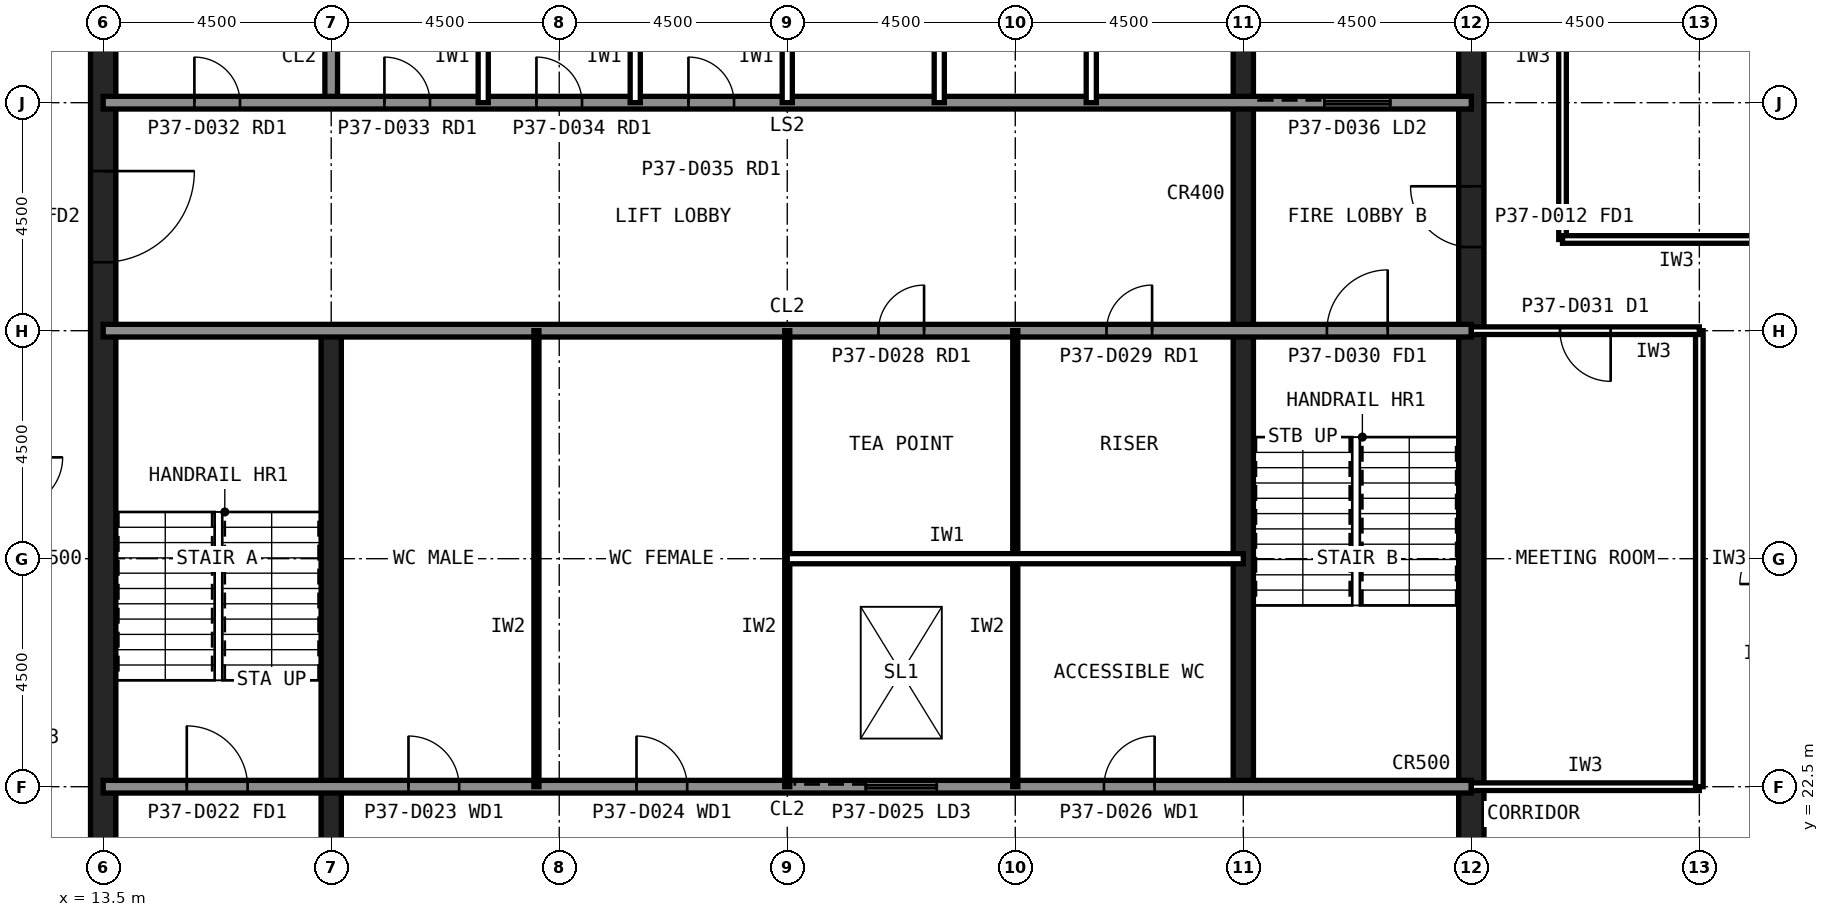
"""IFC4 building model, lengths in metres.
Left out: names, types, materials, properties, quantities, classifications, styles, units other than length and angle.
Written with IfcOpenShell. Run it as: python <this file> out.ifc"""

import sys

from ifc_helpers import new_model, si_unit, direction, frame, frame_2d, origin, place, context, subcontext, project, spatial, rectangle, extrude, element, fill, save


model = new_model("IFC4")
c1 = context("Model", 3, precision=1e-05, world=origin(), true_north=direction((0.0, 1.0)))
c2 = subcontext(c1, "Body", "Model", "MODEL_VIEW")
j1 = project(units=[si_unit("LENGTHUNIT", "METRE"), si_unit("PLANEANGLEUNIT", "RADIAN")], contexts=[c1])
p1 = place(None, origin())
s1 = spatial("IfcSite", under=j1, at=p1, CompositionType="ELEMENT")
p2 = place(p1, origin())
s2 = spatial("IfcBuilding", under=s1, at=p2, CompositionType="ELEMENT")
p3 = place(p2, frame((0.0, 0.0, 159.6)))
s3 = spatial("IfcBuildingStorey", under=s2, at=p3, CompositionType="ELEMENT", Elevation=159.6)
p4 = place(p3, frame((40.5, 13.5, 0.0), z_axis=(0.0, 0.0, 1.0), x_axis=(0.0, 1.0, 0.0)))
e1 = element("IfcWall", 1, at=p4, inside=s3, PredefinedType="SHEAR", context=c2, shape_type="SweptSolid", body=[
    extrude(rectangle(XDim=27.0, YDim=0.5, at=frame_2d((13.5, 0.0))), origin(), (0.0, 0.0, 1.0), 4.0),
])
p5 = place(p4, frame((5.85, 0.0, 0.0)))
e2 = element("IfcOpeningElement", 2, at=p5, cuts=e1, PredefinedType="OPENING", context=c2, shape_type="SweptSolid", body=[
    extrude(rectangle(XDim=1.8, YDim=2.1, at=frame_2d((0.9, 1.05))), frame((0.0, 0.26, 0.0), z_axis=(0.0, -1.0, 0.0), x_axis=(1.0, 0.0, 0.0)), (0.0, 0.0, 1.0), 0.52),
])
p6 = place(p4, frame((19.65, 0.0, 0.0)))
e3 = element("IfcOpeningElement", 3, at=p6, cuts=e1, PredefinedType="OPENING", context=c2, shape_type="SweptSolid", body=[
    extrude(rectangle(XDim=1.2, YDim=2.1, at=frame_2d((0.6, 1.05))), frame((0.0, 0.26, 0.0), z_axis=(0.0, -1.0, 0.0), x_axis=(1.0, 0.0, 0.0)), (0.0, 0.0, 1.0), 0.52),
])
p7 = place(p3, frame((13.5, 40.5, 0.0), z_axis=(0.0, 0.0, 1.0), x_axis=(0.0, -1.0, 0.0)))
e4 = element("IfcWall", 4, at=p7, inside=s3, PredefinedType="SHEAR", context=c2, shape_type="SweptSolid", body=[
    extrude(rectangle(XDim=27.0, YDim=0.5, at=frame_2d((13.5, 0.0))), origin(), (0.0, 0.0, 1.0), 4.0),
])
p8 = place(p7, frame((19.65, 0.0, 0.0)))
e5 = element("IfcOpeningElement", 5, at=p8, cuts=e4, PredefinedType="OPENING", context=c2, shape_type="SweptSolid", body=[
    extrude(rectangle(XDim=1.2, YDim=2.1, at=frame_2d((0.6, 1.05))), frame((0.0, 0.26, 0.0), z_axis=(0.0, -1.0, 0.0), x_axis=(1.0, 0.0, 0.0)), (0.0, 0.0, 1.0), 0.52),
])
p9 = place(p7, frame((5.85, 0.0, 0.0)))
e6 = element("IfcOpeningElement", 6, at=p9, cuts=e4, PredefinedType="OPENING", context=c2, shape_type="SweptSolid", body=[
    extrude(rectangle(XDim=1.8, YDim=2.1, at=frame_2d((0.9, 1.05))), frame((0.0, 0.26, 0.0), z_axis=(0.0, -1.0, 0.0), x_axis=(1.0, 0.0, 0.0)), (0.0, 0.0, 1.0), 0.52),
])
p10 = place(p3, frame((18.0, 13.5, 0.0), z_axis=(0.0, 0.0, 1.0), x_axis=(0.0, 1.0, 0.0)))
e7 = element("IfcWall", 7, at=p10, inside=s3, PredefinedType="SHEAR", context=c2, shape_type="SweptSolid", body=[
    extrude(rectangle(XDim=18.0, YDim=0.4, at=frame_2d((9.0, 0.0))), origin(), (0.0, 0.0, 1.0), 4.0),
])
p11 = place(p3, frame((18.0, 36.0, 0.0), z_axis=(0.0, 0.0, 1.0), x_axis=(0.0, 1.0, 0.0)))
e8 = element("IfcWall", 8, at=p11, inside=s3, PredefinedType="SOLIDWALL", context=c2, shape_type="SweptSolid", body=[
    extrude(rectangle(XDim=4.5, YDim=0.25, at=frame_2d((2.25, 0.0))), origin(), (0.0, 0.0, 1.0), 3.84),
])
p12 = place(p3, frame((36.0, 22.5, 0.0), z_axis=(0.0, 0.0, 1.0), x_axis=(0.0, 1.0, 0.0)))
e9 = element("IfcWall", 9, at=p12, inside=s3, PredefinedType="SHEAR", context=c2, shape_type="SweptSolid", body=[
    extrude(rectangle(XDim=18.0, YDim=0.4, at=frame_2d((9.0, 0.0))), origin(), (0.0, 0.0, 1.0), 4.0),
])
p13 = place(p3, frame((13.5, 36.0, 0.0), z_axis=(0.0, 0.0, 1.0), x_axis=(1.0, 0.0, 0.0)))
e10 = element("IfcWall", 10, at=p13, inside=s3, PredefinedType="SOLIDWALL", context=c2, shape_type="SweptSolid", body=[
    extrude(rectangle(XDim=27.0, YDim=0.25, at=frame_2d((13.5, 0.0))), origin(), (0.0, 0.0, 1.0), 3.84),
])
p14 = place(p13, frame((1.8, 0.0, 0.0)))
e11 = element("IfcOpeningElement", 11, at=p14, cuts=e10, PredefinedType="OPENING", context=c2, shape_type="SweptSolid", body=[
    extrude(rectangle(XDim=0.9, YDim=2.1, at=frame_2d((0.45, 1.05))), frame((0.0, 0.135, 0.0), z_axis=(0.0, -1.0, 0.0), x_axis=(1.0, 0.0, 0.0)), (0.0, 0.0, 1.0), 0.27),
])
p15 = place(p13, frame((5.55, 0.0, 0.0)))
e12 = element("IfcOpeningElement", 12, at=p15, cuts=e10, PredefinedType="OPENING", context=c2, shape_type="SweptSolid", body=[
    extrude(rectangle(XDim=0.9, YDim=2.1, at=frame_2d((0.45, 1.05))), frame((0.0, 0.135, 0.0), z_axis=(0.0, -1.0, 0.0), x_axis=(1.0, 0.0, 0.0)), (0.0, 0.0, 1.0), 0.27),
])
p16 = place(p13, frame((8.55, 0.0, 0.0)))
e13 = element("IfcOpeningElement", 13, at=p16, cuts=e10, PredefinedType="OPENING", context=c2, shape_type="SweptSolid", body=[
    extrude(rectangle(XDim=0.9, YDim=2.1, at=frame_2d((0.45, 1.05))), frame((0.0, 0.135, 0.0), z_axis=(0.0, -1.0, 0.0), x_axis=(1.0, 0.0, 0.0)), (0.0, 0.0, 1.0), 0.27),
])
p17 = place(p13, frame((11.55, 0.0, 0.0)))
e14 = element("IfcOpeningElement", 14, at=p17, cuts=e10, PredefinedType="OPENING", context=c2, shape_type="SweptSolid", body=[
    extrude(rectangle(XDim=0.9, YDim=2.1, at=frame_2d((0.45, 1.05))), frame((0.0, 0.135, 0.0), z_axis=(0.0, -1.0, 0.0), x_axis=(1.0, 0.0, 0.0)), (0.0, 0.0, 1.0), 0.27),
])
p18 = place(p13, frame((24.1, 0.0, 0.0)))
e15 = element("IfcOpeningElement", 15, at=p18, cuts=e10, PredefinedType="OPENING", context=c2, shape_type="SweptSolid", body=[
    extrude(rectangle(XDim=1.3, YDim=2.2, at=frame_2d((0.65, 1.1))), frame((0.0, 0.135, 0.0), z_axis=(0.0, -1.0, 0.0), x_axis=(1.0, 0.0, 0.0)), (0.0, 0.0, 1.0), 0.27),
])
p19 = place(p3, frame((13.5, 22.5, 0.0), z_axis=(0.0, 0.0, 1.0), x_axis=(1.0, 0.0, 0.0)))
e16 = element("IfcWall", 16, at=p19, inside=s3, PredefinedType="SOLIDWALL", context=c2, shape_type="SweptSolid", body=[
    extrude(rectangle(XDim=27.0, YDim=0.25, at=frame_2d((13.5, 0.0))), origin(), (0.0, 0.0, 1.0), 3.84),
])
p20 = place(p19, frame((1.65, 0.0, 0.0)))
e17 = element("IfcOpeningElement", 17, at=p20, cuts=e16, PredefinedType="OPENING", context=c2, shape_type="SweptSolid", body=[
    extrude(rectangle(XDim=1.2, YDim=2.1, at=frame_2d((0.6, 1.05))), frame((0.0, 0.135, 0.0), z_axis=(0.0, -1.0, 0.0), x_axis=(1.0, 0.0, 0.0)), (0.0, 0.0, 1.0), 0.27),
])
p21 = place(p19, frame((6.025, 0.0, 0.0)))
e18 = element("IfcOpeningElement", 18, at=p21, cuts=e16, PredefinedType="OPENING", context=c2, shape_type="SweptSolid", body=[
    extrude(rectangle(XDim=1.0, YDim=2.1, at=frame_2d((0.5, 1.05))), frame((0.0, 0.135, 0.0), z_axis=(0.0, -1.0, 0.0), x_axis=(1.0, 0.0, 0.0)), (0.0, 0.0, 1.0), 0.27),
])
p22 = place(p19, frame((10.525, 0.0, 0.0)))
e19 = element("IfcOpeningElement", 19, at=p22, cuts=e16, PredefinedType="OPENING", context=c2, shape_type="SweptSolid", body=[
    extrude(rectangle(XDim=1.0, YDim=2.1, at=frame_2d((0.5, 1.05))), frame((0.0, 0.135, 0.0), z_axis=(0.0, -1.0, 0.0), x_axis=(1.0, 0.0, 0.0)), (0.0, 0.0, 1.0), 0.27),
])
p23 = place(p19, frame((19.75, 0.0, 0.0)))
e20 = element("IfcOpeningElement", 20, at=p23, cuts=e16, PredefinedType="OPENING", context=c2, shape_type="SweptSolid", body=[
    extrude(rectangle(XDim=1.0, YDim=2.1, at=frame_2d((0.5, 1.05))), frame((0.0, 0.135, 0.0), z_axis=(0.0, -1.0, 0.0), x_axis=(1.0, 0.0, 0.0)), (0.0, 0.0, 1.0), 0.27),
])
p24 = place(p19, frame((15.05, 0.0, 0.0)))
e21 = element("IfcOpeningElement", 21, at=p24, cuts=e16, PredefinedType="OPENING", context=c2, shape_type="SweptSolid", body=[
    extrude(rectangle(XDim=1.4, YDim=2.4, at=frame_2d((0.7, 1.2))), frame((0.0, 0.135, 0.0), z_axis=(0.0, -1.0, 0.0), x_axis=(1.0, 0.0, 0.0)), (0.0, 0.0, 1.0), 0.27),
])
p25 = place(p3, frame((13.5, 31.5, 0.0), z_axis=(0.0, 0.0, 1.0), x_axis=(1.0, 0.0, 0.0)))
e22 = element("IfcWall", 22, at=p25, inside=s3, PredefinedType="SOLIDWALL", context=c2, shape_type="SweptSolid", body=[
    extrude(rectangle(XDim=27.0, YDim=0.25, at=frame_2d((13.5, 0.0))), origin(), (0.0, 0.0, 1.0), 3.84),
])
p26 = place(p25, frame((24.15, 0.0, 0.0)))
e23 = element("IfcOpeningElement", 23, at=p26, cuts=e22, PredefinedType="OPENING", context=c2, shape_type="SweptSolid", body=[
    extrude(rectangle(XDim=1.2, YDim=2.1, at=frame_2d((0.6, 1.05))), frame((0.0, 0.135, 0.0), z_axis=(0.0, -1.0, 0.0), x_axis=(1.0, 0.0, 0.0)), (0.0, 0.0, 1.0), 0.27),
])
p27 = place(p25, frame((15.3, 0.0, 0.0)))
e24 = element("IfcOpeningElement", 24, at=p27, cuts=e22, PredefinedType="OPENING", context=c2, shape_type="SweptSolid", body=[
    extrude(rectangle(XDim=0.9, YDim=2.1, at=frame_2d((0.45, 1.05))), frame((0.0, 0.135, 0.0), z_axis=(0.0, -1.0, 0.0), x_axis=(1.0, 0.0, 0.0)), (0.0, 0.0, 1.0), 0.27),
])
p28 = place(p25, frame((19.8, 0.0, 0.0)))
e25 = element("IfcOpeningElement", 25, at=p28, cuts=e22, PredefinedType="OPENING", context=c2, shape_type="SweptSolid", body=[
    extrude(rectangle(XDim=0.9, YDim=2.1, at=frame_2d((0.45, 1.05))), frame((0.0, 0.135, 0.0), z_axis=(0.0, -1.0, 0.0), x_axis=(1.0, 0.0, 0.0)), (0.0, 0.0, 1.0), 0.27),
])
for number, where, z_axis, x_axis in (
    (26, (21.0, 36.0, 0.0), (0.0, 0.0, 1.0), (0.0, 1.0, 0.0)),
    (27, (24.0, 36.0, 0.0), (0.0, 0.0, 1.0), (0.0, 1.0, 0.0)),
    (28, (27.0, 36.0, 0.0), (0.0, 0.0, 1.0), (0.0, 1.0, 0.0)),
    (29, (30.0, 36.0, 0.0), (0.0, 0.0, 1.0), (0.0, 1.0, 0.0)),
    (30, (33.0, 36.0, 0.0), (0.0, 0.0, 1.0), (0.0, 1.0, 0.0)),
):
    element("IfcWall", number, at=place(p3, frame(where, z_axis=z_axis, x_axis=x_axis)), inside=s3, PredefinedType="PARTITIONING", context=c2, shape_type="SweptSolid", body=[
        extrude(rectangle(XDim=4.5, YDim=0.2, at=frame_2d((2.25, 0.0))), origin(), (0.0, 0.0, 1.0), 3.84),
    ])
for number, where, z_axis, x_axis in (
    (31, (22.05, 22.5, 0.0), (0.0, 0.0, 1.0), (0.0, 1.0, 0.0)),
    (32, (27.0, 22.5, 0.0), (0.0, 0.0, 1.0), (0.0, 1.0, 0.0)),
    (33, (31.5, 22.5, 0.0), (0.0, 0.0, 1.0), (0.0, 1.0, 0.0)),
):
    element("IfcWall", number, at=place(p3, frame(where, z_axis=z_axis, x_axis=x_axis)), inside=s3, PredefinedType="PLUMBINGWALL", context=c2, shape_type="SweptSolid", body=[
        extrude(rectangle(XDim=9.0, YDim=0.1, at=frame_2d((4.5, 0.0))), origin(), (0.0, 0.0, 1.0), 3.84),
    ])
p29 = place(p3, frame((27.0, 27.0, 0.0), z_axis=(0.0, 0.0, 1.0), x_axis=(1.0, 0.0, 0.0)))
e34 = element("IfcWall", 34, at=p29, inside=s3, PredefinedType="PARTITIONING", context=c2, shape_type="SweptSolid", body=[
    extrude(rectangle(XDim=9.0, YDim=0.2, at=frame_2d((4.5, 0.0))), origin(), (0.0, 0.0, 1.0), 3.84),
])
p30 = place(p3, frame((42.3, 33.3, 0.0), z_axis=(0.0, 0.0, 1.0), x_axis=(0.0, 1.0, 0.0)))
e35 = element("IfcWall", 35, at=p30, inside=s3, PredefinedType="PARTITIONING", context=c2, shape_type="SweptSolid", body=[
    extrude(rectangle(XDim=7.2, YDim=0.15, at=frame_2d((3.6, 0.0))), origin(), (0.0, 0.0, 1.0), 3.84),
])
p31 = place(p3, frame((46.8, 33.3, 0.0), z_axis=(0.0, 0.0, 1.0), x_axis=(-1.0, 0.0, 0.0)))
e36 = element("IfcWall", 36, at=p31, inside=s3, PredefinedType="PARTITIONING", context=c2, shape_type="SweptSolid", body=[
    extrude(rectangle(XDim=4.5, YDim=0.15, at=frame_2d((2.25, 0.0))), origin(), (0.0, 0.0, 1.0), 3.84),
])
p32 = place(p3, frame((40.5, 22.5, 0.0), z_axis=(0.0, 0.0, 1.0), x_axis=(1.0, 0.0, 0.0)))
e37 = element("IfcWall", 37, at=p32, inside=s3, PredefinedType="PARTITIONING", context=c2, shape_type="SweptSolid", body=[
    extrude(rectangle(XDim=4.5, YDim=0.15, at=frame_2d((2.25, 0.0))), origin(), (0.0, 0.0, 1.0), 2.989),
])
p33 = place(p3, frame((45.0, 22.5, 0.0), z_axis=(0.0, 0.0, 1.0), x_axis=(0.0, 1.0, 0.0)))
e38 = element("IfcWall", 38, at=p33, inside=s3, PredefinedType="PARTITIONING", context=c2, shape_type="SweptSolid", body=[
    extrude(rectangle(XDim=9.0, YDim=0.15, at=frame_2d((4.5, 0.0))), origin(), (0.0, 0.0, 1.0), 3.84),
])
p34 = place(p3, frame((45.0, 31.5, 0.0), z_axis=(0.0, 0.0, 1.0), x_axis=(-1.0, 0.0, 0.0)))
e39 = element("IfcWall", 39, at=p34, inside=s3, PredefinedType="PARTITIONING", context=c2, shape_type="SweptSolid", body=[
    extrude(rectangle(XDim=4.5, YDim=0.15, at=frame_2d((2.25, 0.0))), origin(), (0.0, 0.0, 1.0), 2.989),
])
p35 = place(p34, frame((1.75, 0.0, 0.0)))
e40 = element("IfcOpeningElement", 40, at=p35, cuts=e39, PredefinedType="OPENING", context=c2, shape_type="SweptSolid", body=[
    extrude(rectangle(XDim=1.0, YDim=2.1, at=frame_2d((0.5, 1.05))), frame((0.0, 0.085, 0.0), z_axis=(0.0, -1.0, 0.0), x_axis=(1.0, 0.0, 0.0)), (0.0, 0.0, 1.0), 0.17),
])
p36 = place(p9, origin())
e41 = element("IfcDoor", 41, at=p36, inside=s3, OperationType="SINGLE_SWING_LEFT", PredefinedType="DOOR", context=c2, shape_type="SweptSolid", body=[
    extrude(rectangle(XDim=1.8, YDim=2.1, at=frame_2d((0.9, 1.05))), frame((0.0, 0.025, 0.0), z_axis=(0.0, -1.0, 0.0), x_axis=(1.0, 0.0, 0.0)), (0.0, 0.0, 1.0), 0.05),
])
fill(e6, e41)
p37 = place(p6, origin())
e42 = element("IfcDoor", 42, at=p37, inside=s3, OperationType="SINGLE_SWING_RIGHT", PredefinedType="DOOR", context=c2, shape_type="SweptSolid", body=[
    extrude(rectangle(XDim=1.2, YDim=2.1, at=frame_2d((0.6, 1.05))), frame((0.0, 0.025, 0.0), z_axis=(0.0, -1.0, 0.0), x_axis=(1.0, 0.0, 0.0)), (0.0, 0.0, 1.0), 0.05),
])
fill(e3, e42)
p38 = place(p20, origin())
e43 = element("IfcDoor", 43, at=p38, inside=s3, OperationType="SINGLE_SWING_LEFT", PredefinedType="DOOR", context=c2, shape_type="SweptSolid", body=[
    extrude(rectangle(XDim=1.2, YDim=2.1, at=frame_2d((0.6, 1.05))), frame((0.0, 0.025, 0.0), z_axis=(0.0, -1.0, 0.0), x_axis=(1.0, 0.0, 0.0)), (0.0, 0.0, 1.0), 0.05),
])
fill(e17, e43)
p39 = place(p26, origin())
e44 = element("IfcDoor", 44, at=p39, inside=s3, OperationType="SINGLE_SWING_RIGHT", PredefinedType="DOOR", context=c2, shape_type="SweptSolid", body=[
    extrude(rectangle(XDim=1.2, YDim=2.1, at=frame_2d((0.6, 1.05))), frame((0.0, 0.025, 0.0), z_axis=(0.0, -1.0, 0.0), x_axis=(1.0, 0.0, 0.0)), (0.0, 0.0, 1.0), 0.05),
])
fill(e23, e44)
p40 = place(p21, origin())
e45 = element("IfcDoor", 45, at=p40, inside=s3, OperationType="SINGLE_SWING_LEFT", PredefinedType="DOOR", context=c2, shape_type="SweptSolid", body=[
    extrude(rectangle(XDim=1.0, YDim=2.1, at=frame_2d((0.5, 1.05))), frame((0.0, 0.025, 0.0), z_axis=(0.0, -1.0, 0.0), x_axis=(1.0, 0.0, 0.0)), (0.0, 0.0, 1.0), 0.05),
])
fill(e18, e45)
p41 = place(p22, origin())
e46 = element("IfcDoor", 46, at=p41, inside=s3, OperationType="SINGLE_SWING_LEFT", PredefinedType="DOOR", context=c2, shape_type="SweptSolid", body=[
    extrude(rectangle(XDim=1.0, YDim=2.1, at=frame_2d((0.5, 1.05))), frame((0.0, 0.025, 0.0), z_axis=(0.0, -1.0, 0.0), x_axis=(1.0, 0.0, 0.0)), (0.0, 0.0, 1.0), 0.05),
])
fill(e19, e46)
p42 = place(p23, origin())
e47 = element("IfcDoor", 47, at=p42, inside=s3, OperationType="SINGLE_SWING_RIGHT", PredefinedType="DOOR", context=c2, shape_type="SweptSolid", body=[
    extrude(rectangle(XDim=1.0, YDim=2.1, at=frame_2d((0.5, 1.05))), frame((0.0, 0.025, 0.0), z_axis=(0.0, -1.0, 0.0), x_axis=(1.0, 0.0, 0.0)), (0.0, 0.0, 1.0), 0.05),
])
fill(e20, e47)
p43 = place(p27, origin())
e48 = element("IfcDoor", 48, at=p43, inside=s3, OperationType="SINGLE_SWING_RIGHT", PredefinedType="DOOR", context=c2, shape_type="SweptSolid", body=[
    extrude(rectangle(XDim=0.9, YDim=2.1, at=frame_2d((0.45, 1.05))), frame((0.0, 0.025, 0.0), z_axis=(0.0, -1.0, 0.0), x_axis=(1.0, 0.0, 0.0)), (0.0, 0.0, 1.0), 0.05),
])
fill(e24, e48)
p44 = place(p28, origin())
e49 = element("IfcDoor", 49, at=p44, inside=s3, OperationType="SINGLE_SWING_RIGHT", PredefinedType="DOOR", context=c2, shape_type="SweptSolid", body=[
    extrude(rectangle(XDim=0.9, YDim=2.1, at=frame_2d((0.45, 1.05))), frame((0.0, 0.025, 0.0), z_axis=(0.0, -1.0, 0.0), x_axis=(1.0, 0.0, 0.0)), (0.0, 0.0, 1.0), 0.05),
])
fill(e25, e49)
p45 = place(p14, origin())
e50 = element("IfcDoor", 50, at=p45, inside=s3, OperationType="SINGLE_SWING_LEFT", PredefinedType="DOOR", context=c2, shape_type="SweptSolid", body=[
    extrude(rectangle(XDim=0.9, YDim=2.1, at=frame_2d((0.45, 1.05))), frame((0.0, 0.025, 0.0), z_axis=(0.0, -1.0, 0.0), x_axis=(1.0, 0.0, 0.0)), (0.0, 0.0, 1.0), 0.05),
])
fill(e11, e50)
p46 = place(p15, origin())
e51 = element("IfcDoor", 51, at=p46, inside=s3, OperationType="SINGLE_SWING_LEFT", PredefinedType="DOOR", context=c2, shape_type="SweptSolid", body=[
    extrude(rectangle(XDim=0.9, YDim=2.1, at=frame_2d((0.45, 1.05))), frame((0.0, 0.025, 0.0), z_axis=(0.0, -1.0, 0.0), x_axis=(1.0, 0.0, 0.0)), (0.0, 0.0, 1.0), 0.05),
])
fill(e12, e51)
p47 = place(p16, origin())
e52 = element("IfcDoor", 52, at=p47, inside=s3, OperationType="SINGLE_SWING_LEFT", PredefinedType="DOOR", context=c2, shape_type="SweptSolid", body=[
    extrude(rectangle(XDim=0.9, YDim=2.1, at=frame_2d((0.45, 1.05))), frame((0.0, 0.025, 0.0), z_axis=(0.0, -1.0, 0.0), x_axis=(1.0, 0.0, 0.0)), (0.0, 0.0, 1.0), 0.05),
])
fill(e13, e52)
p48 = place(p17, origin())
e53 = element("IfcDoor", 53, at=p48, inside=s3, OperationType="SINGLE_SWING_LEFT", PredefinedType="DOOR", context=c2, shape_type="SweptSolid", body=[
    extrude(rectangle(XDim=0.9, YDim=2.1, at=frame_2d((0.45, 1.05))), frame((0.0, 0.025, 0.0), z_axis=(0.0, -1.0, 0.0), x_axis=(1.0, 0.0, 0.0)), (0.0, 0.0, 1.0), 0.05),
])
fill(e14, e53)
p49 = place(p18, origin())
e54 = element("IfcDoor", 54, at=p49, inside=s3, OperationType="SLIDING_TO_LEFT", PredefinedType="DOOR", context=c2, shape_type="SweptSolid", body=[
    extrude(rectangle(XDim=1.3, YDim=2.2, at=frame_2d((0.65, 1.1))), frame((0.0, 0.025, 0.0), z_axis=(0.0, -1.0, 0.0), x_axis=(1.0, 0.0, 0.0)), (0.0, 0.0, 1.0), 0.05),
])
fill(e15, e54)
p50 = place(p24, origin())
e55 = element("IfcDoor", 55, at=p50, inside=s3, OperationType="SLIDING_TO_LEFT", PredefinedType="DOOR", context=c2, shape_type="SweptSolid", body=[
    extrude(rectangle(XDim=1.4, YDim=2.4, at=frame_2d((0.7, 1.2))), frame((0.0, 0.025, 0.0), z_axis=(0.0, -1.0, 0.0), x_axis=(1.0, 0.0, 0.0)), (0.0, 0.0, 1.0), 0.05),
])
fill(e21, e55)
p51 = place(p35, origin())
e56 = element("IfcDoor", 56, at=p51, inside=s3, OperationType="SINGLE_SWING_LEFT", PredefinedType="DOOR", context=c2, shape_type="SweptSolid", body=[
    extrude(rectangle(XDim=1.0, YDim=2.1, at=frame_2d((0.5, 1.05))), frame((0.0, 0.025, 0.0), z_axis=(0.0, -1.0, 0.0), x_axis=(1.0, 0.0, 0.0)), (0.0, 0.0, 1.0), 0.05),
])
fill(e40, e56)
save(model, sys.argv[1])
